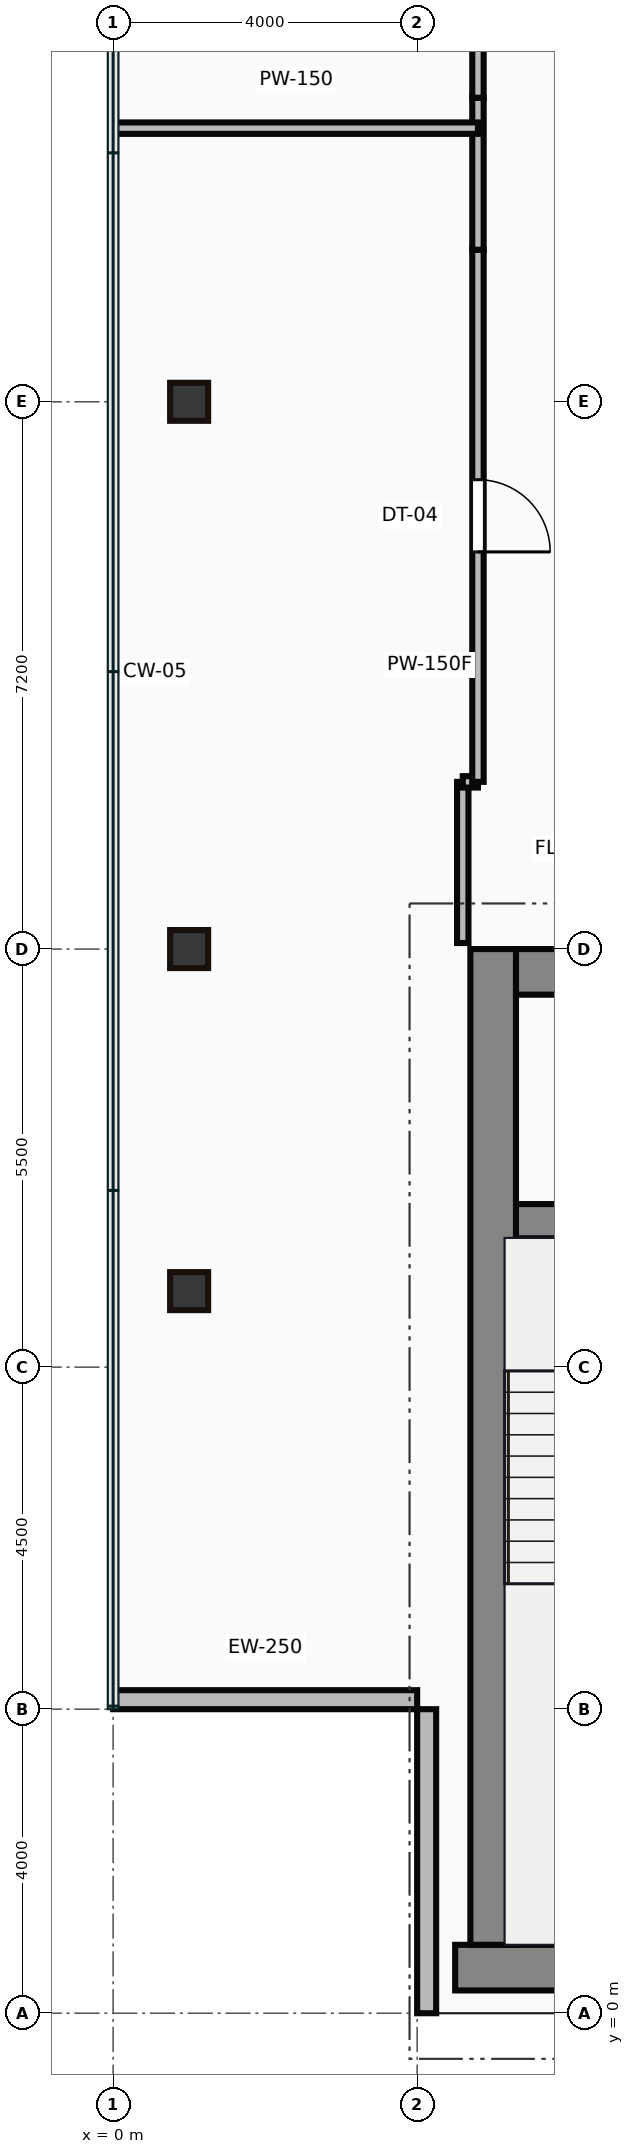
"""IFC4 building model, lengths in metres.
Left out: names, types, materials, properties, quantities, classifications, styles, units other than length and angle.
Written with IfcOpenShell. Run it as: python <this file> out.ifc"""

import sys

from ifc_helpers import new_model, si_unit, direction, frame, frame_2d, origin, origin_2d, place, context, subcontext, project, spatial, rectangle, hollow_rectangle, extrude, source, transform, mapped, element, fill, save


model = new_model("IFC4")
c1 = context("Model", 3, precision=1e-05, world=origin(), true_north=direction((0.0, 1.0)))
c2 = subcontext(c1, "Body", "Model", "MODEL_VIEW")
j1 = project(units=[si_unit("LENGTHUNIT", "METRE"), si_unit("PLANEANGLEUNIT", "RADIAN")], contexts=[c1])
p1 = place(None, origin())
s1 = spatial("IfcSite", under=j1, at=p1, CompositionType="ELEMENT")
p2 = place(p1, origin())
s2 = spatial("IfcBuilding", under=s1, at=p2, CompositionType="ELEMENT")
p3 = place(p2, frame((0.0, 0.0, 273.4)))
s3 = spatial("IfcBuildingStorey", under=s2, at=p3, CompositionType="ELEMENT", Elevation=273.4)
m1 = source(origin(), c2, "Body", "SweptSolid", [
    extrude(rectangle(XDim=29.5, YDim=0.6, at=frame_2d((14.75, 0.0))), origin(), (0.0, 0.0, 1.0), 3.65),
])
p4 = place(p3, frame((4.5, 0.6, 0.0), z_axis=(0.0, 0.0, 1.0), x_axis=(1.0, 0.0, 0.0)))
e1 = element("IfcWall", 1, at=p4, inside=s3, PredefinedType="SHEAR", context=c2, shape_type="MappedRepresentation", body=[
    mapped(m1, transform((0.0, 0.0, 0.0))),
])
m2 = source(origin(), c2, "Body", "SweptSolid", [
    extrude(rectangle(XDim=13.1, YDim=0.6, at=frame_2d((6.55, 0.0))), origin(), (0.0, 0.0, 1.0), 3.65),
])
p5 = place(p3, frame((5.0, 0.9, 0.0), z_axis=(0.0, 0.0, 1.0), x_axis=(0.0, 1.0, 0.0)))
e2 = element("IfcWall", 2, at=p5, inside=s3, PredefinedType="SHEAR", context=c2, shape_type="MappedRepresentation", body=[
    mapped(m2, transform((0.0, 0.0, 0.0))),
])
m3 = source(origin(), c2, "Body", "SweptSolid", [
    extrude(rectangle(XDim=9.1, YDim=0.6, at=frame_2d((4.55, 0.0))), origin(), (0.0, 0.0, 1.0), 3.65),
])
p6 = place(p3, frame((5.3, 13.7, 0.0), z_axis=(0.0, 0.0, 1.0), x_axis=(1.0, 0.0, 0.0)))
e3 = element("IfcWall", 3, at=p6, inside=s3, PredefinedType="SHEAR", context=c2, shape_type="MappedRepresentation", body=[
    mapped(m3, transform((0.0, 0.0, 0.0))),
])
p7 = place(p6, frame((4.1, 0.0, 0.0)))
e4 = element("IfcOpeningElement", 4, at=p7, cuts=e3, PredefinedType="OPENING", context=c2, shape_type="SweptSolid", body=[
    extrude(rectangle(XDim=1.1, YDim=2.15, at=frame_2d((0.55, 1.075))), frame((0.0, 0.31, 0.0), z_axis=(0.0, -1.0, 0.0), x_axis=(1.0, 0.0, 0.0)), (0.0, 0.0, 1.0), 0.62),
])
m4 = source(origin(), c2, "Body", "SweptSolid", [
    extrude(rectangle(XDim=3.39, YDim=0.45, at=frame_2d((1.695, 0.0))), origin(), (0.0, 0.0, 1.0), 3.65),
])
p8 = place(p3, frame((5.25, 10.42, 0.0), z_axis=(0.0, 0.0, 1.0), x_axis=(1.0, 0.0, 0.0)))
e5 = element("IfcWall", 5, at=p8, inside=s3, PredefinedType="SHEAR", context=c2, shape_type="MappedRepresentation", body=[
    mapped(m4, transform((0.0, 0.0, 0.0))),
])
p9 = place(p8, frame((1.05, 0.0, 0.0)))
e6 = element("IfcOpeningElement", 6, at=p9, cuts=e5, PredefinedType="OPENING", context=c2, shape_type="SweptSolid", body=[
    extrude(rectangle(XDim=1.1, YDim=2.15, at=frame_2d((0.55, 1.075))), frame((0.0, 0.235, 0.0), z_axis=(0.0, -1.0, 0.0), x_axis=(1.0, 0.0, 0.0)), (0.0, 0.0, 1.0), 0.47),
])
m5 = source(origin(), c2, "Body", "SweptSolid", [
    extrude(hollow_rectangle(XDim=0.5, YDim=0.5, WallThickness=0.022, at=origin_2d()), origin(), (0.0, 0.0, 1.0), 3.65),
])
for number, where, z_axis, x_axis in (
    (7, (1.0, 9.5, 0.0), (0.0, 0.0, 1.0), (1.0, 0.0, 0.0)),
    (8, (1.0, 14.0, 0.0), (0.0, 0.0, 1.0), (1.0, 0.0, 0.0)),
    (9, (1.0, 21.2, 0.0), (0.0, 0.0, 1.0), (1.0, 0.0, 0.0)),
):
    element("IfcColumn", number, at=place(p3, frame(where, z_axis=z_axis, x_axis=x_axis)), inside=s3, PredefinedType="COLUMN", context=c2, shape_type="MappedRepresentation", body=[
        mapped(m5, transform((0.0, 0.0, 0.0))),
    ])
m6 = source(origin(), c2, "Body", "SweptSolid", [
    extrude(rectangle(XDim=4.0, YDim=0.25, at=frame_2d((2.0, 0.0))), origin(), (0.0, 0.0, 1.0), 3.4),
])
for number, where, z_axis, x_axis in (
    (10, (0.0, 4.125, 0.0), (0.0, 0.0, 1.0), (1.0, 0.0, 0.0)),
    (11, (4.125, 4.0, 0.0), (0.0, 0.0, 1.0), (0.0, -1.0, 0.0)),
):
    element("IfcWall", number, at=place(p3, frame(where, z_axis=z_axis, x_axis=x_axis)), inside=s3, PredefinedType="STANDARD", context=c2, shape_type="MappedRepresentation", body=[
        mapped(m6, transform((0.0, 0.0, 0.0))),
    ])
m7 = source(origin(), c2, "Body", "SweptSolid", [
    extrude(rectangle(XDim=2.12, YDim=0.15, at=frame_2d((1.06, 0.0))), origin(), (0.0, 0.0, 1.0), 3.4),
])
p10 = place(p3, frame((4.6, 14.08, 0.0), z_axis=(0.0, 0.0, 1.0), x_axis=(0.0, 1.0, 0.0)))
e12 = element("IfcWall", 12, at=p10, inside=s3, PredefinedType="PARTITIONING", context=c2, shape_type="MappedRepresentation", body=[
    mapped(m7, transform((0.0, 0.0, 0.0))),
])
m8 = source(origin(), c2, "Body", "SweptSolid", [
    extrude(rectangle(XDim=0.2, YDim=0.15, at=frame_2d((0.1, 0.0))), origin(), (0.0, 0.0, 1.0), 3.4),
])
p11 = place(p3, frame((4.6, 16.2, 0.0), z_axis=(0.0, 0.0, 1.0), x_axis=(1.0, 0.0, 0.0)))
e13 = element("IfcWall", 13, at=p11, inside=s3, PredefinedType="PARTITIONING", context=c2, shape_type="MappedRepresentation", body=[
    mapped(m8, transform((0.0, 0.0, 0.0))),
])
m9 = source(origin(), c2, "Body", "SweptSolid", [
    extrude(rectangle(XDim=7.0, YDim=0.15, at=frame_2d((3.5, 0.0))), origin(), (0.0, 0.0, 1.0), 3.4),
])
p12 = place(p3, frame((4.8, 16.2, 0.0), z_axis=(0.0, 0.0, 1.0), x_axis=(0.0, 1.0, 0.0)))
e14 = element("IfcWall", 14, at=p12, inside=s3, PredefinedType="PARTITIONING", context=c2, shape_type="MappedRepresentation", body=[
    mapped(m9, transform((0.0, 0.0, 0.0))),
])
p13 = place(p12, frame((3.025, 0.0, 0.0)))
e15 = element("IfcOpeningElement", 15, at=p13, cuts=e14, PredefinedType="OPENING", context=c2, shape_type="SweptSolid", body=[
    extrude(rectangle(XDim=0.95, YDim=2.15, at=frame_2d((0.475, 1.075))), frame((0.0, 0.085, 0.0), z_axis=(0.0, -1.0, 0.0), x_axis=(1.0, 0.0, 0.0)), (0.0, 0.0, 1.0), 0.17),
])
m10 = source(origin(), c2, "Body", "SweptSolid", [
    extrude(rectangle(XDim=2.0, YDim=0.15, at=frame_2d((1.0, 0.0))), origin(), (0.0, 0.0, 1.0), 3.4),
])
p14 = place(p3, frame((4.8, 23.2, 0.0), z_axis=(0.0, 0.0, 1.0), x_axis=(0.0, 1.0, 0.0)))
e16 = element("IfcWall", 16, at=p14, inside=s3, PredefinedType="PARTITIONING", context=c2, shape_type="MappedRepresentation", body=[
    mapped(m10, transform((0.0, 0.0, 0.0))),
])
m11 = source(origin(), c2, "Body", "SweptSolid", [
    extrude(rectangle(XDim=7.6, YDim=0.15, at=frame_2d((3.8, 0.0))), origin(), (0.0, 0.0, 1.0), 3.4),
])
p15 = place(p3, frame((4.8, 25.2, 0.0), z_axis=(0.0, 0.0, 1.0), x_axis=(0.0, 1.0, 0.0)))
e17 = element("IfcWall", 17, at=p15, inside=s3, PredefinedType="PARTITIONING", context=c2, shape_type="MappedRepresentation", body=[
    mapped(m11, transform((0.0, 0.0, 0.0))),
])
p16 = place(p15, frame((3.325, 0.0, 0.0)))
e18 = element("IfcOpeningElement", 18, at=p16, cuts=e17, PredefinedType="OPENING", context=c2, shape_type="SweptSolid", body=[
    extrude(rectangle(XDim=0.95, YDim=2.15, at=frame_2d((0.475, 1.075))), frame((0.0, 0.085, 0.0), z_axis=(0.0, -1.0, 0.0), x_axis=(1.0, 0.0, 0.0)), (0.0, 0.0, 1.0), 0.17),
])
m12 = source(origin(), c2, "Body", "SweptSolid", [
    extrude(rectangle(XDim=4.78, YDim=0.15, at=frame_2d((2.39, 0.0))), origin(), (0.0, 0.0, 1.0), 3.4),
])
p17 = place(p3, frame((0.02, 24.8, 0.0), z_axis=(0.0, 0.0, 1.0), x_axis=(1.0, 0.0, 0.0)))
e19 = element("IfcWall", 19, at=p17, inside=s3, PredefinedType="PARTITIONING", context=c2, shape_type="MappedRepresentation", body=[
    mapped(m12, transform((0.0, 0.0, 0.0))),
])
m13 = source(origin(), c2, "Body", "SweptSolid", [
    extrude(rectangle(XDim=0.95, YDim=2.15, at=frame_2d((0.475, 1.075))), frame((0.0, 0.025, 0.0), z_axis=(0.0, -1.0, 0.0), x_axis=(1.0, 0.0, 0.0)), (0.0, 0.0, 1.0), 0.05),
])
p18 = place(p13, origin())
e20 = element("IfcDoor", 20, at=p18, inside=s3, OperationType="SINGLE_SWING_LEFT", PredefinedType="DOOR", context=c2, shape_type="MappedRepresentation", body=[
    mapped(m13, transform((0.0, 0.0, 0.0))),
])
fill(e15, e20)
save(model, sys.argv[1])
